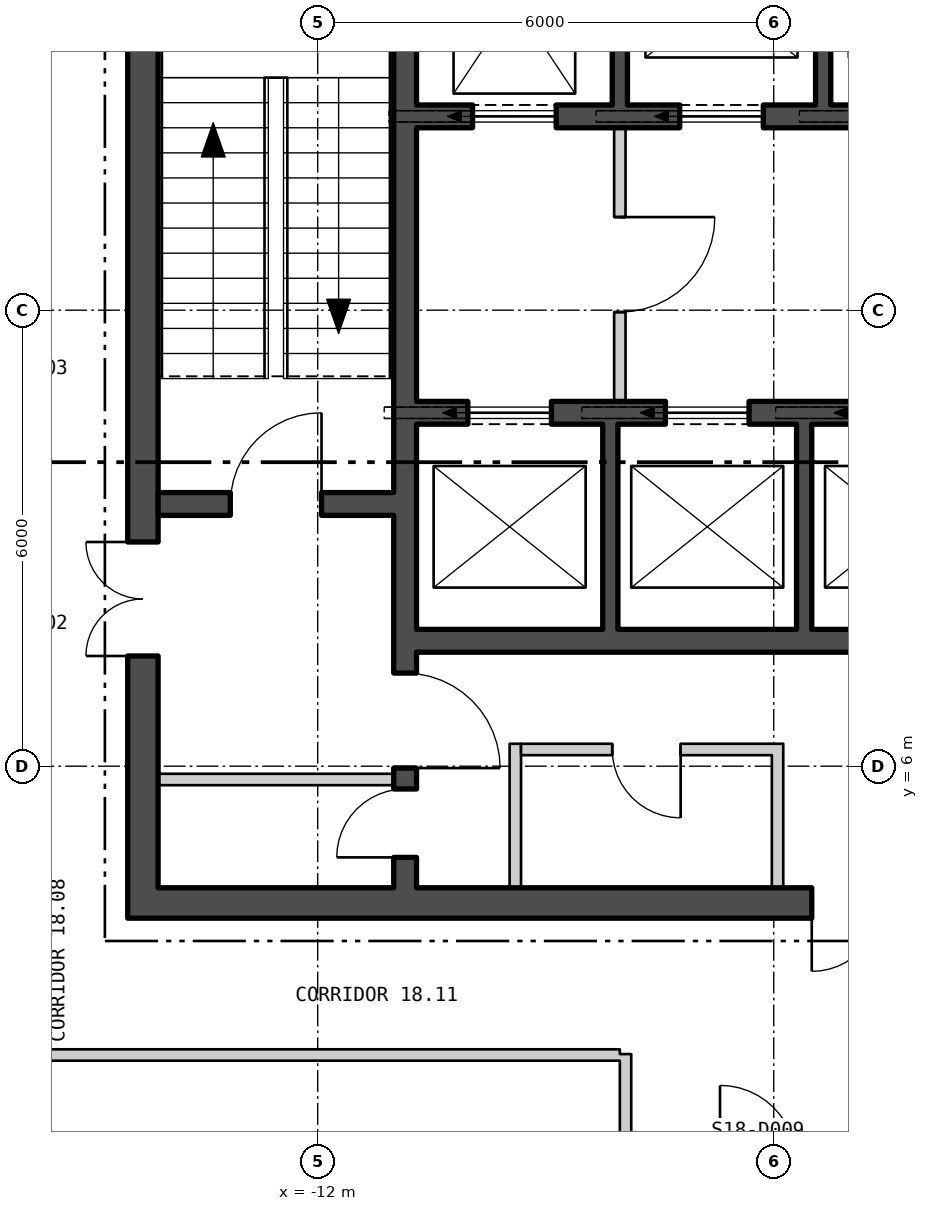
"""IFC4 building model, lengths in metres.
Left out: names, types, materials, properties, quantities, classifications, styles, units other than length and angle.
Written with IfcOpenShell. Run it as: python <this file> out.ifc"""

import sys

from ifc_helpers import new_model, si_unit, direction, frame, frame_2d, origin, place, context, subcontext, project, spatial, polyline, rectangle, outline, extrude, element, fill, save


model = new_model("IFC4")
c1 = context("Model", 3, precision=1e-05, world=origin(), true_north=direction((0.0, 1.0)))
c2 = subcontext(c1, "Body", "Model", "MODEL_VIEW")
j1 = project(units=[si_unit("LENGTHUNIT", "METRE"), si_unit("PLANEANGLEUNIT", "RADIAN")], contexts=[c1])
p1 = place(None, origin())
s1 = spatial("IfcSite", under=j1, at=p1, CompositionType="ELEMENT")
p2 = place(p1, origin())
s2 = spatial("IfcBuilding", under=s1, at=p2, CompositionType="ELEMENT")
p3 = place(p2, frame((0.0, 0.0, 245.4)))
s3 = spatial("IfcBuildingStorey", under=s2, at=p3, CompositionType="ELEMENT", Elevation=245.4)
p4 = place(p3, frame((-25.85, 14.822, -0.18), z_axis=(0.0, 0.0, 1.0), x_axis=(0.500000335318, -0.866025210188, 0.0)))
e1 = element("IfcWall", 1, at=p4, inside=s3, PredefinedType="SOLIDWALL", context=c2, shape_type="SweptSolid", body=[
    extrude(outline(polyline([(-0.13, -0.225), (45.88, -0.225), (45.62, 0.225), (0.13, 0.225), (-0.13, -0.225)])), origin(), (0.0, 0.0, 1.0), 3.68),
])
p5 = place(p4, frame((1.425, 0.0, 1.08)))
e2 = element("IfcOpeningElement", 2, at=p5, cuts=e1, PredefinedType="OPENING", context=c2, shape_type="SweptSolid", body=[
    extrude(rectangle(XDim=2.4, YDim=2.0, at=frame_2d((1.2, 1.0))), frame((0.0, 0.235, 0.0), z_axis=(0.0, -1.0, 0.0), x_axis=(1.0, 0.0, 0.0)), (0.0, 0.0, 1.0), 0.47),
])
p6 = place(p4, frame((10.403, 0.0, 1.08)))
e3 = element("IfcOpeningElement", 3, at=p6, cuts=e1, PredefinedType="OPENING", context=c2, shape_type="SweptSolid", body=[
    extrude(rectangle(XDim=2.4, YDim=2.0, at=frame_2d((1.2, 1.0))), frame((0.0, 0.235, 0.0), z_axis=(0.0, -1.0, 0.0), x_axis=(1.0, 0.0, 0.0)), (0.0, 0.0, 1.0), 0.47),
])
p7 = place(p4, frame((14.912, 0.0, 1.08)))
e4 = element("IfcOpeningElement", 4, at=p7, cuts=e1, PredefinedType="OPENING", context=c2, shape_type="SweptSolid", body=[
    extrude(rectangle(XDim=2.4, YDim=2.0, at=frame_2d((1.2, 1.0))), frame((0.0, 0.235, 0.0), z_axis=(0.0, -1.0, 0.0), x_axis=(1.0, 0.0, 0.0)), (0.0, 0.0, 1.0), 0.47),
])
p8 = place(p4, frame((19.421, 0.0, 1.08)))
e5 = element("IfcOpeningElement", 5, at=p8, cuts=e1, PredefinedType="OPENING", context=c2, shape_type="SweptSolid", body=[
    extrude(rectangle(XDim=2.4, YDim=2.0, at=frame_2d((1.2, 1.0))), frame((0.0, 0.235, 0.0), z_axis=(0.0, -1.0, 0.0), x_axis=(1.0, 0.0, 0.0)), (0.0, 0.0, 1.0), 0.47),
])
p9 = place(p4, frame((23.929, 0.0, 1.08)))
e6 = element("IfcOpeningElement", 6, at=p9, cuts=e1, PredefinedType="OPENING", context=c2, shape_type="SweptSolid", body=[
    extrude(rectangle(XDim=2.4, YDim=2.0, at=frame_2d((1.2, 1.0))), frame((0.0, 0.235, 0.0), z_axis=(0.0, -1.0, 0.0), x_axis=(1.0, 0.0, 0.0)), (0.0, 0.0, 1.0), 0.47),
])
p10 = place(p4, frame((28.438, 0.0, 1.08)))
e7 = element("IfcOpeningElement", 7, at=p10, cuts=e1, PredefinedType="OPENING", context=c2, shape_type="SweptSolid", body=[
    extrude(rectangle(XDim=2.4, YDim=2.0, at=frame_2d((1.2, 1.0))), frame((0.0, 0.235, 0.0), z_axis=(0.0, -1.0, 0.0), x_axis=(1.0, 0.0, 0.0)), (0.0, 0.0, 1.0), 0.47),
])
p11 = place(p4, frame((32.947, 0.0, 1.08)))
e8 = element("IfcOpeningElement", 8, at=p11, cuts=e1, PredefinedType="OPENING", context=c2, shape_type="SweptSolid", body=[
    extrude(rectangle(XDim=2.4, YDim=2.0, at=frame_2d((1.2, 1.0))), frame((0.0, 0.235, 0.0), z_axis=(0.0, -1.0, 0.0), x_axis=(1.0, 0.0, 0.0)), (0.0, 0.0, 1.0), 0.47),
])
p12 = place(p4, frame((37.455, 0.0, 1.08)))
e9 = element("IfcOpeningElement", 9, at=p12, cuts=e1, PredefinedType="OPENING", context=c2, shape_type="SweptSolid", body=[
    extrude(rectangle(XDim=2.4, YDim=2.0, at=frame_2d((1.2, 1.0))), frame((0.0, 0.235, 0.0), z_axis=(0.0, -1.0, 0.0), x_axis=(1.0, 0.0, 0.0)), (0.0, 0.0, 1.0), 0.47),
])
p13 = place(p4, frame((41.925, 0.0, 1.08)))
e10 = element("IfcOpeningElement", 10, at=p13, cuts=e1, PredefinedType="OPENING", context=c2, shape_type="SweptSolid", body=[
    extrude(rectangle(XDim=2.4, YDim=2.0, at=frame_2d((1.2, 1.0))), frame((0.0, 0.235, 0.0), z_axis=(0.0, -1.0, 0.0), x_axis=(1.0, 0.0, 0.0)), (0.0, 0.0, 1.0), 0.47),
])
p14 = place(p3, frame((-14.5, 4.2, 0.0), z_axis=(0.0, 0.0, 1.0), x_axis=(1.0, 0.0, 0.0)))
e11 = element("IfcWall", 11, at=p14, inside=s3, PredefinedType="SHEAR", context=c2, shape_type="SweptSolid", body=[
    extrude(rectangle(XDim=29.0, YDim=0.4, at=frame_2d((14.5, 0.0))), origin(), (0.0, 0.0, 1.0), 3.7),
])
p15 = place(p14, frame((9.0, 0.0, 0.0)))
e12 = element("IfcOpeningElement", 12, at=p15, cuts=e11, PredefinedType="OPENING", context=c2, shape_type="SweptSolid", body=[
    extrude(rectangle(XDim=1.8, YDim=2.4, at=frame_2d((0.9, 1.2))), frame((0.0, 0.21, 0.0), z_axis=(0.0, -1.0, 0.0), x_axis=(1.0, 0.0, 0.0)), (0.0, 0.0, 1.0), 0.42),
])
p16 = place(p14, frame((19.0, 0.0, 0.0)))
e13 = element("IfcOpeningElement", 13, at=p16, cuts=e11, PredefinedType="OPENING", context=c2, shape_type="SweptSolid", body=[
    extrude(rectangle(XDim=1.8, YDim=2.4, at=frame_2d((0.9, 1.2))), frame((0.0, 0.21, 0.0), z_axis=(0.0, -1.0, 0.0), x_axis=(1.0, 0.0, 0.0)), (0.0, 0.0, 1.0), 0.42),
])
p17 = place(p3, frame((-14.3, 4.4, 0.0), z_axis=(0.0, 0.0, 1.0), x_axis=(0.0, 1.0, 0.0)))
e14 = element("IfcWall", 14, at=p17, inside=s3, PredefinedType="SHEAR", context=c2, shape_type="SweptSolid", body=[
    extrude(rectangle(XDim=13.2, YDim=0.4, at=frame_2d((6.6, 0.0))), origin(), (0.0, 0.0, 1.0), 3.7),
])
p18 = place(p17, frame((3.05, 0.0, 0.0)))
e15 = element("IfcOpeningElement", 15, at=p18, cuts=e14, PredefinedType="OPENING", context=c2, shape_type="SweptSolid", body=[
    extrude(rectangle(XDim=1.5, YDim=2.1, at=frame_2d((0.75, 1.05))), frame((0.0, 0.21, 0.0), z_axis=(0.0, -1.0, 0.0), x_axis=(1.0, 0.0, 0.0)), (0.0, 0.0, 1.0), 0.42),
])
p19 = place(p3, frame((-10.85, 4.4, 0.0), z_axis=(0.0, 0.0, 1.0), x_axis=(0.0, 1.0, 0.0)))
e16 = element("IfcWall", 16, at=p19, inside=s3, PredefinedType="SHEAR", context=c2, shape_type="SweptSolid", body=[
    extrude(rectangle(XDim=13.2, YDim=0.3, at=frame_2d((6.6, 0.0))), origin(), (0.0, 0.0, 1.0), 3.7),
])
p20 = place(p19, frame((1.575, 0.0, 0.0)))
e17 = element("IfcOpeningElement", 17, at=p20, cuts=e16, PredefinedType="OPENING", context=c2, shape_type="SweptSolid", body=[
    extrude(rectangle(XDim=1.25, YDim=2.1, at=frame_2d((0.625, 1.05))), frame((0.0, 0.16, 0.0), z_axis=(0.0, -1.0, 0.0), x_axis=(1.0, 0.0, 0.0)), (0.0, 0.0, 1.0), 0.32),
])
p21 = place(p19, frame((0.4, 0.0, 0.0)))
e18 = element("IfcOpeningElement", 18, at=p21, cuts=e16, PredefinedType="OPENING", context=c2, shape_type="SweptSolid", body=[
    extrude(rectangle(XDim=0.9, YDim=2.1, at=frame_2d((0.45, 1.05))), frame((0.0, 0.16, 0.0), z_axis=(0.0, -1.0, 0.0), x_axis=(1.0, 0.0, 0.0)), (0.0, 0.0, 1.0), 0.32),
])
p22 = place(p3, frame((-14.1, 9.45, 0.0), z_axis=(0.0, 0.0, 1.0), x_axis=(1.0, 0.0, 0.0)))
e19 = element("IfcWall", 19, at=p22, inside=s3, PredefinedType="SHEAR", context=c2, shape_type="SweptSolid", body=[
    extrude(rectangle(XDim=3.1, YDim=0.3, at=frame_2d((1.55, 0.0))), origin(), (0.0, 0.0, 1.0), 3.7),
])
p23 = place(p22, frame((0.95, 0.0, 0.0)))
e20 = element("IfcOpeningElement", 20, at=p23, cuts=e19, PredefinedType="OPENING", context=c2, shape_type="SweptSolid", body=[
    extrude(rectangle(XDim=1.2, YDim=2.1, at=frame_2d((0.6, 1.05))), frame((0.0, 0.16, 0.0), z_axis=(0.0, -1.0, 0.0), x_axis=(1.0, 0.0, 0.0)), (0.0, 0.0, 1.0), 0.32),
])
p24 = place(p3, frame((-10.7, 14.55, 0.0), z_axis=(0.0, 0.0, 1.0), x_axis=(1.0, 0.0, 0.0)))
e21 = element("IfcWall", 21, at=p24, inside=s3, PredefinedType="SHEAR", context=c2, shape_type="SweptSolid", body=[
    extrude(rectangle(XDim=21.4, YDim=0.3, at=frame_2d((10.7, 0.0))), origin(), (0.0, 0.0, 1.0), 3.7),
])
p25 = place(p24, frame((0.738, 0.0, 0.0)))
e22 = element("IfcOpeningElement", 22, at=p25, cuts=e21, PredefinedType="OPENING", context=c2, shape_type="SweptSolid", body=[
    extrude(rectangle(XDim=1.1, YDim=2.1, at=frame_2d((0.55, 1.05))), frame((0.0, 0.16, 0.0), z_axis=(0.0, -1.0, 0.0), x_axis=(1.0, 0.0, 0.0)), (0.0, 0.0, 1.0), 0.32),
])
p26 = place(p24, frame((3.462, 0.0, 0.0)))
e23 = element("IfcOpeningElement", 23, at=p26, cuts=e21, PredefinedType="OPENING", context=c2, shape_type="SweptSolid", body=[
    extrude(rectangle(XDim=1.1, YDim=2.1, at=frame_2d((0.55, 1.05))), frame((0.0, 0.16, 0.0), z_axis=(0.0, -1.0, 0.0), x_axis=(1.0, 0.0, 0.0)), (0.0, 0.0, 1.0), 0.32),
])
p27 = place(p24, frame((6.138, 0.0, 0.0)))
e24 = element("IfcOpeningElement", 24, at=p27, cuts=e21, PredefinedType="OPENING", context=c2, shape_type="SweptSolid", body=[
    extrude(rectangle(XDim=1.1, YDim=2.1, at=frame_2d((0.55, 1.05))), frame((0.0, 0.16, 0.0), z_axis=(0.0, -1.0, 0.0), x_axis=(1.0, 0.0, 0.0)), (0.0, 0.0, 1.0), 0.32),
])
p28 = place(p24, frame((8.812, 0.0, 0.0)))
e25 = element("IfcOpeningElement", 25, at=p28, cuts=e21, PredefinedType="OPENING", context=c2, shape_type="SweptSolid", body=[
    extrude(rectangle(XDim=1.1, YDim=2.1, at=frame_2d((0.55, 1.05))), frame((0.0, 0.16, 0.0), z_axis=(0.0, -1.0, 0.0), x_axis=(1.0, 0.0, 0.0)), (0.0, 0.0, 1.0), 0.32),
])
p29 = place(p24, frame((19.562, 0.0, 0.0)))
e26 = element("IfcOpeningElement", 26, at=p29, cuts=e21, PredefinedType="OPENING", context=c2, shape_type="SweptSolid", body=[
    extrude(rectangle(XDim=1.1, YDim=2.1, at=frame_2d((0.55, 1.05))), frame((0.0, 0.16, 0.0), z_axis=(0.0, -1.0, 0.0), x_axis=(1.0, 0.0, 0.0)), (0.0, 0.0, 1.0), 0.32),
])
p30 = place(p24, frame((12.875, 0.0, 0.0)))
e27 = element("IfcOpeningElement", 27, at=p30, cuts=e21, PredefinedType="OPENING", context=c2, shape_type="SweptSolid", body=[
    extrude(rectangle(XDim=1.0, YDim=2.1, at=frame_2d((0.5, 1.05))), frame((0.0, 0.16, 0.0), z_axis=(0.0, -1.0, 0.0), x_axis=(1.0, 0.0, 0.0)), (0.0, 0.0, 1.0), 0.32),
])
p31 = place(p24, frame((16.887, 0.0, 0.0)))
e28 = element("IfcOpeningElement", 28, at=p31, cuts=e21, PredefinedType="OPENING", context=c2, shape_type="SweptSolid", body=[
    extrude(rectangle(XDim=1.0, YDim=2.1, at=frame_2d((0.5, 1.05))), frame((0.0, 0.16, 0.0), z_axis=(0.0, -1.0, 0.0), x_axis=(1.0, 0.0, 0.0)), (0.0, 0.0, 1.0), 0.32),
])
p32 = place(p3, frame((-10.7, 10.65, 0.0), z_axis=(0.0, 0.0, 1.0), x_axis=(1.0, 0.0, 0.0)))
e29 = element("IfcWall", 29, at=p32, inside=s3, PredefinedType="SHEAR", context=c2, shape_type="SweptSolid", body=[
    extrude(rectangle(XDim=10.3, YDim=0.3, at=frame_2d((5.15, 0.0))), origin(), (0.0, 0.0, 1.0), 3.7),
])
p33 = place(p32, frame((0.675, 0.0, 0.0)))
e30 = element("IfcOpeningElement", 30, at=p33, cuts=e29, PredefinedType="OPENING", context=c2, shape_type="SweptSolid", body=[
    extrude(rectangle(XDim=1.1, YDim=2.1, at=frame_2d((0.55, 1.05))), frame((0.0, 0.16, 0.0), z_axis=(0.0, -1.0, 0.0), x_axis=(1.0, 0.0, 0.0)), (0.0, 0.0, 1.0), 0.32),
])
p34 = place(p32, frame((3.275, 0.0, 0.0)))
e31 = element("IfcOpeningElement", 31, at=p34, cuts=e29, PredefinedType="OPENING", context=c2, shape_type="SweptSolid", body=[
    extrude(rectangle(XDim=1.1, YDim=2.1, at=frame_2d((0.55, 1.05))), frame((0.0, 0.16, 0.0), z_axis=(0.0, -1.0, 0.0), x_axis=(1.0, 0.0, 0.0)), (0.0, 0.0, 1.0), 0.32),
])
p35 = place(p32, frame((5.825, 0.0, 0.0)))
e32 = element("IfcOpeningElement", 32, at=p35, cuts=e29, PredefinedType="OPENING", context=c2, shape_type="SweptSolid", body=[
    extrude(rectangle(XDim=1.1, YDim=2.1, at=frame_2d((0.55, 1.05))), frame((0.0, 0.16, 0.0), z_axis=(0.0, -1.0, 0.0), x_axis=(1.0, 0.0, 0.0)), (0.0, 0.0, 1.0), 0.32),
])
p36 = place(p32, frame((8.425, 0.0, 0.0)))
e33 = element("IfcOpeningElement", 33, at=p36, cuts=e29, PredefinedType="OPENING", context=c2, shape_type="SweptSolid", body=[
    extrude(rectangle(XDim=1.0, YDim=2.1, at=frame_2d((0.5, 1.05))), frame((0.0, 0.16, 0.0), z_axis=(0.0, -1.0, 0.0), x_axis=(1.0, 0.0, 0.0)), (0.0, 0.0, 1.0), 0.32),
])
p37 = place(p3, frame((-10.7, 7.65, 0.0), z_axis=(0.0, 0.0, 1.0), x_axis=(1.0, 0.0, 0.0)))
e34 = element("IfcWall", 34, at=p37, inside=s3, PredefinedType="SHEAR", context=c2, shape_type="SweptSolid", body=[
    extrude(rectangle(XDim=10.3, YDim=0.3, at=frame_2d((5.15, 0.0))), origin(), (0.0, 0.0, 1.0), 3.7),
])
for number, where, z_axis, x_axis in (
    (35, (-8.025, 14.7, 0.0), (0.0, 0.0, 1.0), (0.0, 1.0, 0.0)),
    (36, (-5.35, 14.7, 0.0), (0.0, 0.0, 1.0), (0.0, 1.0, 0.0)),
):
    element("IfcWall", number, at=place(p3, frame(where, z_axis=z_axis, x_axis=x_axis)), inside=s3, PredefinedType="SHEAR", context=c2, shape_type="SweptSolid", body=[
        extrude(rectangle(XDim=2.9, YDim=0.2, at=frame_2d((1.45, 0.0))), origin(), (0.0, 0.0, 1.0), 3.7),
    ])
for number, where, z_axis, x_axis in (
    (37, (-8.15, 7.8, 0.0), (0.0, 0.0, 1.0), (0.0, 1.0, 0.0)),
    (38, (-5.6, 7.8, 0.0), (0.0, 0.0, 1.0), (0.0, 1.0, 0.0)),
):
    element("IfcWall", number, at=place(p3, frame(where, z_axis=z_axis, x_axis=x_axis)), inside=s3, PredefinedType="SHEAR", context=c2, shape_type="SweptSolid", body=[
        extrude(rectangle(XDim=2.7, YDim=0.2, at=frame_2d((1.35, 0.0))), origin(), (0.0, 0.0, 1.0), 3.7),
    ])
p38 = place(p3, frame((-8.025, 10.8, 0.0), z_axis=(0.0, 0.0, 1.0), x_axis=(0.0, 1.0, 0.0)))
e39 = element("IfcWall", 39, at=p38, inside=s3, PredefinedType="PARTITIONING", context=c2, shape_type="SweptSolid", body=[
    extrude(rectangle(XDim=3.6, YDim=0.15, at=frame_2d((1.8, 0.0))), origin(), (0.0, 0.0, 1.0), 3.7),
])
p39 = place(p38, frame((1.175, 0.0, 0.0)))
e40 = element("IfcOpeningElement", 40, at=p39, cuts=e39, PredefinedType="OPENING", context=c2, shape_type="SweptSolid", body=[
    extrude(rectangle(XDim=1.25, YDim=2.1, at=frame_2d((0.625, 1.05))), frame((0.0, 0.085, 0.0), z_axis=(0.0, -1.0, 0.0), x_axis=(1.0, 0.0, 0.0)), (0.0, 0.0, 1.0), 0.17),
])
p40 = place(p3, frame((-14.1, 5.825, 0.0), z_axis=(0.0, 0.0, 1.0), x_axis=(1.0, 0.0, 0.0)))
e41 = element("IfcWall", 41, at=p40, inside=s3, PredefinedType="PARTITIONING", context=c2, shape_type="SweptSolid", body=[
    extrude(rectangle(XDim=3.1, YDim=0.15, at=frame_2d((1.55, 0.0))), origin(), (0.0, 0.0, 1.0), 3.7),
])
for number, where, z_axis, x_axis in (
    (42, (-9.4, 4.4, 0.0), (0.0, 0.0, 1.0), (0.0, 1.0, 0.0)),
    (43, (-5.95, 4.4, 0.0), (0.0, 0.0, 1.0), (0.0, 1.0, 0.0)),
):
    element("IfcWall", number, at=place(p3, frame(where, z_axis=z_axis, x_axis=x_axis)), inside=s3, PredefinedType="PARTITIONING", context=c2, shape_type="SweptSolid", body=[
        extrude(rectangle(XDim=1.895, YDim=0.15, at=frame_2d((0.948, 0.0))), origin(), (0.0, 0.0, 1.0), 3.7),
    ])
p41 = place(p3, frame((-9.325, 6.22, 0.0), z_axis=(0.0, 0.0, 1.0), x_axis=(1.0, 0.0, 0.0)))
e44 = element("IfcWall", 44, at=p41, inside=s3, PredefinedType="PARTITIONING", context=c2, shape_type="SweptSolid", body=[
    extrude(rectangle(XDim=3.3, YDim=0.15, at=frame_2d((1.65, 0.0))), origin(), (0.0, 0.0, 1.0), 3.7),
])
p42 = place(p41, frame((1.2, 0.0, 0.0)))
e45 = element("IfcOpeningElement", 45, at=p42, cuts=e44, PredefinedType="OPENING", context=c2, shape_type="SweptSolid", body=[
    extrude(rectangle(XDim=0.9, YDim=2.1, at=frame_2d((0.45, 1.05))), frame((0.0, 0.085, 0.0), z_axis=(0.0, -1.0, 0.0), x_axis=(1.0, 0.0, 0.0)), (0.0, 0.0, 1.0), 0.17),
])
p43 = place(p3, frame((-16.225, 2.2, 0.0), z_axis=(0.0, 0.0, 1.0), x_axis=(1.0, 0.0, 0.0)))
e46 = element("IfcWall", 46, at=p43, inside=s3, PredefinedType="PARTITIONING", context=c2, shape_type="SweptSolid", body=[
    extrude(rectangle(XDim=8.2, YDim=0.15, at=frame_2d((4.1, 0.0))), origin(), (0.0, 0.0, 1.0), 3.7),
])
p44 = place(p3, frame((-7.95, -13.675, 0.0), z_axis=(0.0, 0.0, 1.0), x_axis=(0.0, 1.0, 0.0)))
e47 = element("IfcWall", 47, at=p44, inside=s3, PredefinedType="PARTITIONING", context=c2, shape_type="SweptSolid", body=[
    extrude(rectangle(XDim=15.887, YDim=0.15, at=frame_2d((7.944, 0.0))), origin(), (0.0, 0.0, 1.0), 3.7),
])
p45 = place(p44, frame((2.642, 0.0, 0.0)))
e48 = element("IfcOpeningElement", 48, at=p45, cuts=e47, PredefinedType="OPENING", context=c2, shape_type="SweptSolid", body=[
    extrude(rectangle(XDim=1.8, YDim=2.1, at=frame_2d((0.9, 1.05))), frame((0.0, 0.085, 0.0), z_axis=(0.0, -1.0, 0.0), x_axis=(1.0, 0.0, 0.0)), (0.0, 0.0, 1.0), 0.17),
])
p46 = place(p44, frame((7.411, 0.0, 0.0)))
e49 = element("IfcOpeningElement", 49, at=p46, cuts=e47, PredefinedType="OPENING", context=c2, shape_type="SweptSolid", body=[
    extrude(rectangle(XDim=1.0, YDim=2.1, at=frame_2d((0.5, 1.05))), frame((0.0, 0.085, 0.0), z_axis=(0.0, -1.0, 0.0), x_axis=(1.0, 0.0, 0.0)), (0.0, 0.0, 1.0), 0.17),
])
p47 = place(p44, frame((13.287, 0.0, 0.0)))
e50 = element("IfcOpeningElement", 50, at=p47, cuts=e47, PredefinedType="OPENING", context=c2, shape_type="SweptSolid", body=[
    extrude(rectangle(XDim=1.0, YDim=2.1, at=frame_2d((0.5, 1.05))), frame((0.0, 0.085, 0.0), z_axis=(0.0, -1.0, 0.0), x_axis=(1.0, 0.0, 0.0)), (0.0, 0.0, 1.0), 0.17),
])
p48 = place(p25, origin())
e51 = element("IfcDoor", 51, at=p48, inside=s3, OperationType="SLIDING_TO_LEFT", PredefinedType="DOOR", context=c2, shape_type="SweptSolid", body=[
    extrude(rectangle(XDim=1.1, YDim=2.1, at=frame_2d((0.55, 1.05))), frame((0.0, 0.025, 0.0), z_axis=(0.0, -1.0, 0.0), x_axis=(1.0, 0.0, 0.0)), (0.0, 0.0, 1.0), 0.05),
])
fill(e22, e51)
p49 = place(p26, origin())
e52 = element("IfcDoor", 52, at=p49, inside=s3, OperationType="SLIDING_TO_LEFT", PredefinedType="DOOR", context=c2, shape_type="SweptSolid", body=[
    extrude(rectangle(XDim=1.1, YDim=2.1, at=frame_2d((0.55, 1.05))), frame((0.0, 0.025, 0.0), z_axis=(0.0, -1.0, 0.0), x_axis=(1.0, 0.0, 0.0)), (0.0, 0.0, 1.0), 0.05),
])
fill(e23, e52)
p50 = place(p33, origin())
e53 = element("IfcDoor", 53, at=p50, inside=s3, OperationType="SLIDING_TO_LEFT", PredefinedType="DOOR", context=c2, shape_type="SweptSolid", body=[
    extrude(rectangle(XDim=1.1, YDim=2.1, at=frame_2d((0.55, 1.05))), frame((0.0, 0.025, 0.0), z_axis=(0.0, -1.0, 0.0), x_axis=(1.0, 0.0, 0.0)), (0.0, 0.0, 1.0), 0.05),
])
fill(e30, e53)
p51 = place(p34, origin())
e54 = element("IfcDoor", 54, at=p51, inside=s3, OperationType="SLIDING_TO_LEFT", PredefinedType="DOOR", context=c2, shape_type="SweptSolid", body=[
    extrude(rectangle(XDim=1.1, YDim=2.1, at=frame_2d((0.55, 1.05))), frame((0.0, 0.025, 0.0), z_axis=(0.0, -1.0, 0.0), x_axis=(1.0, 0.0, 0.0)), (0.0, 0.0, 1.0), 0.05),
])
fill(e31, e54)
p52 = place(p39, origin())
e55 = element("IfcDoor", 55, at=p52, inside=s3, OperationType="SINGLE_SWING_RIGHT", PredefinedType="DOOR", context=c2, shape_type="SweptSolid", body=[
    extrude(rectangle(XDim=1.25, YDim=2.1, at=frame_2d((0.625, 1.05))), frame((0.0, 0.025, 0.0), z_axis=(0.0, -1.0, 0.0), x_axis=(1.0, 0.0, 0.0)), (0.0, 0.0, 1.0), 0.05),
])
fill(e40, e55)
p53 = place(p23, origin())
e56 = element("IfcDoor", 56, at=p53, inside=s3, OperationType="SINGLE_SWING_LEFT", PredefinedType="DOOR", context=c2, shape_type="SweptSolid", body=[
    extrude(rectangle(XDim=1.2, YDim=2.1, at=frame_2d((0.6, 1.05))), frame((0.0, 0.025, 0.0), z_axis=(0.0, -1.0, 0.0), x_axis=(1.0, 0.0, 0.0)), (0.0, 0.0, 1.0), 0.05),
])
fill(e20, e56)
p54 = place(p20, origin())
e57 = element("IfcDoor", 57, at=p54, inside=s3, OperationType="SINGLE_SWING_LEFT", PredefinedType="DOOR", context=c2, shape_type="SweptSolid", body=[
    extrude(rectangle(XDim=1.25, YDim=2.1, at=frame_2d((0.625, 1.05))), frame((0.0, 0.025, 0.0), z_axis=(0.0, -1.0, 0.0), x_axis=(1.0, 0.0, 0.0)), (0.0, 0.0, 1.0), 0.05),
])
fill(e17, e57)
p55 = place(p18, origin())
e58 = element("IfcDoor", 58, at=p55, inside=s3, OperationType="DOUBLE_DOOR_SINGLE_SWING", PredefinedType="DOOR", context=c2, shape_type="SweptSolid", body=[
    extrude(rectangle(XDim=1.5, YDim=2.1, at=frame_2d((0.75, 1.05))), frame((0.0, 0.025, 0.0), z_axis=(0.0, -1.0, 0.0), x_axis=(1.0, 0.0, 0.0)), (0.0, 0.0, 1.0), 0.05),
])
fill(e15, e58)
p56 = place(p21, origin())
e59 = element("IfcDoor", 59, at=p56, inside=s3, OperationType="SINGLE_SWING_RIGHT", PredefinedType="DOOR", context=c2, shape_type="SweptSolid", body=[
    extrude(rectangle(XDim=0.9, YDim=2.1, at=frame_2d((0.45, 1.05))), frame((0.0, 0.025, 0.0), z_axis=(0.0, -1.0, 0.0), x_axis=(1.0, 0.0, 0.0)), (0.0, 0.0, 1.0), 0.05),
])
fill(e18, e59)
p57 = place(p42, origin())
e60 = element("IfcDoor", 60, at=p57, inside=s3, OperationType="SINGLE_SWING_RIGHT", PredefinedType="DOOR", context=c2, shape_type="SweptSolid", body=[
    extrude(rectangle(XDim=0.9, YDim=2.1, at=frame_2d((0.45, 1.05))), frame((0.0, 0.025, 0.0), z_axis=(0.0, -1.0, 0.0), x_axis=(1.0, 0.0, 0.0)), (0.0, 0.0, 1.0), 0.05),
])
fill(e45, e60)
p58 = place(p15, origin())
e61 = element("IfcDoor", 61, at=p58, inside=s3, OperationType="DOUBLE_DOOR_SINGLE_SWING", PredefinedType="DOOR", context=c2, shape_type="SweptSolid", body=[
    extrude(rectangle(XDim=1.8, YDim=2.4, at=frame_2d((0.9, 1.2))), frame((0.0, 0.025, 0.0), z_axis=(0.0, -1.0, 0.0), x_axis=(1.0, 0.0, 0.0)), (0.0, 0.0, 1.0), 0.05),
])
fill(e12, e61)
save(model, sys.argv[1])
